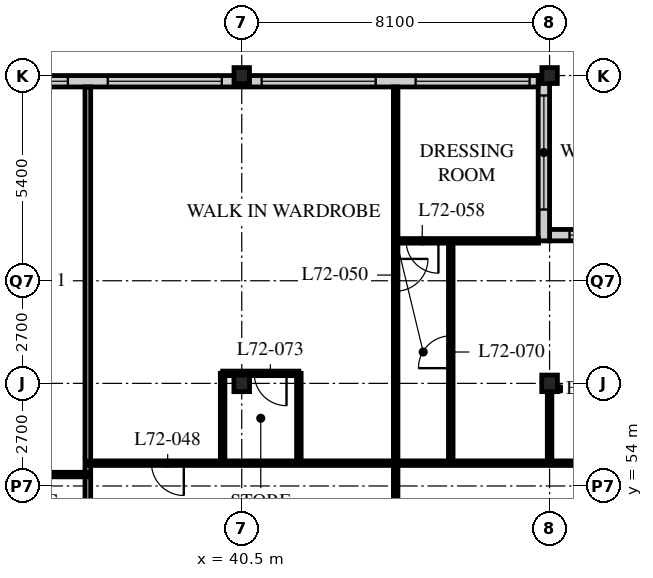
"""IFC4 building model, lengths in metres.
Left out: names, types, materials, properties, quantities, classifications, styles, units other than length and angle.
Written with IfcOpenShell. Run it as: python <this file> out.ifc"""

import sys

from ifc_helpers import new_model, si_unit, direction, frame, frame_2d, origin, origin_2d, place, context, subcontext, project, spatial, rectangle, i_section, extrude, element, fill, save


model = new_model("IFC4")
c1 = context("Model", 3, precision=1e-05, world=origin(), true_north=direction((0.0, 1.0)))
c2 = subcontext(c1, "Body", "Model", "MODEL_VIEW")
j1 = project(units=[si_unit("LENGTHUNIT", "METRE"), si_unit("PLANEANGLEUNIT", "RADIAN")], contexts=[c1])
p1 = place(None, origin())
s1 = spatial("IfcSite", under=j1, at=p1, CompositionType="ELEMENT")
p2 = place(p1, origin())
s2 = spatial("IfcBuilding", under=s1, at=p2, CompositionType="ELEMENT")
p3 = place(p2, frame((0.0, 0.0, 281.4)))
s3 = spatial("IfcBuildingStorey", under=s2, at=p3, CompositionType="ELEMENT", Elevation=281.4)
p4 = place(p3, frame((40.5, 56.7, 0.0), z_axis=(0.0, 0.0, 1.0), x_axis=(1.0, 0.0, 0.0)))
e1 = element("IfcColumn", 1, at=p4, inside=s3, PredefinedType="COLUMN", context=c2, shape_type="SweptSolid", body=[
    extrude(i_section(OverallWidth=0.412, OverallDepth=0.437, WebThickness=0.036, FlangeThickness=0.058, FilletRadius=0.015, at=origin_2d()), origin(), (0.0, 0.0, 1.0), 3.9),
])
p5 = place(p3, frame((40.5, 64.8, 0.0), z_axis=(0.0, 0.0, 1.0), x_axis=(1.0, 0.0, 0.0)))
e2 = element("IfcColumn", 2, at=p5, inside=s3, PredefinedType="COLUMN", context=c2, shape_type="SweptSolid", body=[
    extrude(i_section(OverallWidth=0.407, OverallDepth=0.419, WebThickness=0.031, FlangeThickness=0.049, FilletRadius=0.015, at=origin_2d()), origin(), (0.0, 0.0, 1.0), 3.9),
])
p6 = place(p3, frame((48.6, 56.7, 0.0), z_axis=(0.0, 0.0, 1.0), x_axis=(1.0, 0.0, 0.0)))
e3 = element("IfcColumn", 3, at=p6, inside=s3, PredefinedType="COLUMN", context=c2, shape_type="SweptSolid", body=[
    extrude(i_section(OverallWidth=0.412, OverallDepth=0.437, WebThickness=0.036, FlangeThickness=0.058, FilletRadius=0.015, at=origin_2d()), origin(), (0.0, 0.0, 1.0), 3.9),
])
p7 = place(p3, frame((48.6, 64.8, 0.0), z_axis=(0.0, 0.0, 1.0), x_axis=(1.0, 0.0, 0.0)))
e4 = element("IfcColumn", 4, at=p7, inside=s3, PredefinedType="COLUMN", context=c2, shape_type="SweptSolid", body=[
    extrude(i_section(OverallWidth=0.407, OverallDepth=0.419, WebThickness=0.031, FlangeThickness=0.049, FilletRadius=0.015, at=origin_2d()), origin(), (0.0, 0.0, 1.0), 3.9),
])
p8 = place(p3, frame((52.35, 60.6, 0.0), z_axis=(0.0, 0.0, 1.0), x_axis=(-1.0, 0.0, 0.0)))
e5 = element("IfcWall", 5, at=p8, inside=s3, PredefinedType="SOLIDWALL", context=c2, shape_type="SweptSolid", body=[
    extrude(rectangle(XDim=3.75, YDim=0.3, at=frame_2d((1.875, 0.0))), origin(), (0.0, 0.0, 1.0), 3.69),
])
p9 = place(p8, frame((0.225, 0.0, 0.6)))
e6 = element("IfcOpeningElement", 6, at=p9, cuts=e5, PredefinedType="OPENING", context=c2, shape_type="SweptSolid", body=[
    extrude(rectangle(XDim=3.0, YDim=2.3, at=frame_2d((1.5, 1.15))), frame((0.0, 0.16, 0.0), z_axis=(0.0, -1.0, 0.0), x_axis=(1.0, 0.0, 0.0)), (0.0, 0.0, 1.0), 0.32),
])
p10 = place(p3, frame((48.45, 60.45, 0.0), z_axis=(0.0, 0.0, 1.0), x_axis=(0.0, 1.0, 0.0)))
e7 = element("IfcWall", 7, at=p10, inside=s3, PredefinedType="SOLIDWALL", context=c2, shape_type="SweptSolid", body=[
    extrude(rectangle(XDim=4.35, YDim=0.3, at=frame_2d((2.175, 0.0))), origin(), (0.0, 0.0, 1.0), 3.69),
])
p11 = place(p10, frame((0.825, 0.0, 0.6)))
e8 = element("IfcOpeningElement", 8, at=p11, cuts=e7, PredefinedType="OPENING", context=c2, shape_type="SweptSolid", body=[
    extrude(rectangle(XDim=3.0, YDim=2.3, at=frame_2d((1.5, 1.15))), frame((0.0, 0.16, 0.0), z_axis=(0.0, -1.0, 0.0), x_axis=(1.0, 0.0, 0.0)), (0.0, 0.0, 1.0), 0.32),
])
p12 = place(p3, frame((48.3, 64.65, 0.0), z_axis=(0.0, 0.0, 1.0), x_axis=(-1.0, 0.0, 0.0)))
e9 = element("IfcWall", 9, at=p12, inside=s3, PredefinedType="SOLIDWALL", context=c2, shape_type="SweptSolid", body=[
    extrude(rectangle(XDim=40.2, YDim=0.3, at=frame_2d((20.1, 0.0))), origin(), (0.0, 0.0, 1.0), 3.69),
])
p13 = place(p12, frame((0.225, 0.0, 0.6)))
e10 = element("IfcOpeningElement", 10, at=p13, cuts=e9, PredefinedType="OPENING", context=c2, shape_type="SweptSolid", body=[
    extrude(rectangle(XDim=3.0, YDim=2.4, at=frame_2d((1.5, 1.2))), frame((0.0, 0.16, 0.0), z_axis=(0.0, -1.0, 0.0), x_axis=(1.0, 0.0, 0.0)), (0.0, 0.0, 1.0), 0.32),
])
p14 = place(p12, frame((4.275, 0.0, 0.6)))
e11 = element("IfcOpeningElement", 11, at=p14, cuts=e9, PredefinedType="OPENING", context=c2, shape_type="SweptSolid", body=[
    extrude(rectangle(XDim=3.0, YDim=2.4, at=frame_2d((1.5, 1.2))), frame((0.0, 0.16, 0.0), z_axis=(0.0, -1.0, 0.0), x_axis=(1.0, 0.0, 0.0)), (0.0, 0.0, 1.0), 0.32),
])
p15 = place(p12, frame((8.325, 0.0, 0.6)))
e12 = element("IfcOpeningElement", 12, at=p15, cuts=e9, PredefinedType="OPENING", context=c2, shape_type="SweptSolid", body=[
    extrude(rectangle(XDim=3.0, YDim=2.4, at=frame_2d((1.5, 1.2))), frame((0.0, 0.16, 0.0), z_axis=(0.0, -1.0, 0.0), x_axis=(1.0, 0.0, 0.0)), (0.0, 0.0, 1.0), 0.32),
])
p16 = place(p12, frame((12.375, 0.0, 0.6)))
e13 = element("IfcOpeningElement", 13, at=p16, cuts=e9, PredefinedType="OPENING", context=c2, shape_type="SweptSolid", body=[
    extrude(rectangle(XDim=3.0, YDim=2.4, at=frame_2d((1.5, 1.2))), frame((0.0, 0.16, 0.0), z_axis=(0.0, -1.0, 0.0), x_axis=(1.0, 0.0, 0.0)), (0.0, 0.0, 1.0), 0.32),
])
p17 = place(p12, frame((16.425, 0.0, 0.6)))
e14 = element("IfcOpeningElement", 14, at=p17, cuts=e9, PredefinedType="OPENING", context=c2, shape_type="SweptSolid", body=[
    extrude(rectangle(XDim=3.0, YDim=2.4, at=frame_2d((1.5, 1.2))), frame((0.0, 0.16, 0.0), z_axis=(0.0, -1.0, 0.0), x_axis=(1.0, 0.0, 0.0)), (0.0, 0.0, 1.0), 0.32),
])
p18 = place(p12, frame((20.475, 0.0, 0.6)))
e15 = element("IfcOpeningElement", 15, at=p18, cuts=e9, PredefinedType="OPENING", context=c2, shape_type="SweptSolid", body=[
    extrude(rectangle(XDim=3.0, YDim=2.4, at=frame_2d((1.5, 1.2))), frame((0.0, 0.16, 0.0), z_axis=(0.0, -1.0, 0.0), x_axis=(1.0, 0.0, 0.0)), (0.0, 0.0, 1.0), 0.32),
])
p19 = place(p12, frame((24.525, 0.0, 0.6)))
e16 = element("IfcOpeningElement", 16, at=p19, cuts=e9, PredefinedType="OPENING", context=c2, shape_type="SweptSolid", body=[
    extrude(rectangle(XDim=3.0, YDim=2.4, at=frame_2d((1.5, 1.2))), frame((0.0, 0.16, 0.0), z_axis=(0.0, -1.0, 0.0), x_axis=(1.0, 0.0, 0.0)), (0.0, 0.0, 1.0), 0.32),
])
p20 = place(p12, frame((28.575, 0.0, 0.6)))
e17 = element("IfcOpeningElement", 17, at=p20, cuts=e9, PredefinedType="OPENING", context=c2, shape_type="SweptSolid", body=[
    extrude(rectangle(XDim=3.0, YDim=2.4, at=frame_2d((1.5, 1.2))), frame((0.0, 0.16, 0.0), z_axis=(0.0, -1.0, 0.0), x_axis=(1.0, 0.0, 0.0)), (0.0, 0.0, 1.0), 0.32),
])
p21 = place(p12, frame((32.625, 0.0, 0.6)))
e18 = element("IfcOpeningElement", 18, at=p21, cuts=e9, PredefinedType="OPENING", context=c2, shape_type="SweptSolid", body=[
    extrude(rectangle(XDim=3.0, YDim=2.4, at=frame_2d((1.5, 1.2))), frame((0.0, 0.16, 0.0), z_axis=(0.0, -1.0, 0.0), x_axis=(1.0, 0.0, 0.0)), (0.0, 0.0, 1.0), 0.32),
])
p22 = place(p12, frame((36.675, 0.0, 0.6)))
e19 = element("IfcOpeningElement", 19, at=p22, cuts=e9, PredefinedType="OPENING", context=c2, shape_type="SweptSolid", body=[
    extrude(rectangle(XDim=3.0, YDim=2.4, at=frame_2d((1.5, 1.2))), frame((0.0, 0.16, 0.0), z_axis=(0.0, -1.0, 0.0), x_axis=(1.0, 0.0, 0.0)), (0.0, 0.0, 1.0), 0.32),
])
p23 = place(p3, frame((36.45, 64.5, 0.0), z_axis=(0.0, 0.0, 1.0), x_axis=(0.0, -1.0, 0.0)))
e20 = element("IfcWall", 20, at=p23, inside=s3, PredefinedType="PARTITIONING", context=c2, shape_type="SweptSolid", body=[
    extrude(rectangle(XDim=15.9, YDim=0.15, at=frame_2d((7.95, 0.0))), origin(), (0.0, 0.0, 1.0), 3.69),
])
p24 = place(p3, frame((36.45, 54.6, 0.0), z_axis=(0.0, 0.0, 1.0), x_axis=(1.0, 0.0, 0.0)))
e21 = element("IfcWall", 21, at=p24, inside=s3, PredefinedType="PARTITIONING", context=c2, shape_type="SweptSolid", body=[
    extrude(rectangle(XDim=19.95, YDim=0.12, at=frame_2d((9.975, 0.0))), origin(), (0.0, 0.0, 1.0), 3.69),
])
p25 = place(p24, frame((1.675, 0.0, 0.0)))
e22 = element("IfcOpeningElement", 22, at=p25, cuts=e21, PredefinedType="OPENING", context=c2, shape_type="SweptSolid", body=[
    extrude(rectangle(XDim=0.85, YDim=2.1, at=frame_2d((0.425, 1.05))), frame((0.0, 0.07, 0.0), z_axis=(0.0, -1.0, 0.0), x_axis=(1.0, 0.0, 0.0)), (0.0, 0.0, 1.0), 0.14),
])
p26 = place(p3, frame((44.55, 64.5, 0.0), z_axis=(0.0, 0.0, 1.0), x_axis=(0.0, -1.0, 0.0)))
e23 = element("IfcWall", 23, at=p26, inside=s3, PredefinedType="PARTITIONING", context=c2, shape_type="SweptSolid", body=[
    extrude(rectangle(XDim=17.7, YDim=0.12, at=frame_2d((8.85, 0.0))), origin(), (0.0, 0.0, 1.0), 3.69),
])
p27 = place(p26, frame((12.475, 0.0, 0.0)))
e24 = element("IfcOpeningElement", 24, at=p27, cuts=e23, PredefinedType="OPENING", context=c2, shape_type="SweptSolid", body=[
    extrude(rectangle(XDim=0.85, YDim=2.1, at=frame_2d((0.425, 1.05))), frame((0.0, 0.07, 0.0), z_axis=(0.0, -1.0, 0.0), x_axis=(1.0, 0.0, 0.0)), (0.0, 0.0, 1.0), 0.14),
])
p28 = place(p26, frame((4.525, 0.0, 0.0)))
e25 = element("IfcOpeningElement", 25, at=p28, cuts=e23, PredefinedType="OPENING", context=c2, shape_type="SweptSolid", body=[
    extrude(rectangle(XDim=0.85, YDim=2.1, at=frame_2d((0.425, 1.05))), frame((0.0, 0.07, 0.0), z_axis=(0.0, -1.0, 0.0), x_axis=(1.0, 0.0, 0.0)), (0.0, 0.0, 1.0), 0.14),
])
p29 = place(p3, frame((48.31, 60.45, 0.0), z_axis=(0.0, 0.0, 1.0), x_axis=(-1.0, 0.0, 0.0)))
e26 = element("IfcWall", 26, at=p29, inside=s3, PredefinedType="PARTITIONING", context=c2, shape_type="SweptSolid", body=[
    extrude(rectangle(XDim=3.76, YDim=0.12, at=frame_2d((1.88, 0.0))), origin(), (0.0, 0.0, 1.0), 3.69),
])
p30 = place(p29, frame((2.635, 0.0, 0.0)))
e27 = element("IfcOpeningElement", 27, at=p30, cuts=e26, PredefinedType="OPENING", context=c2, shape_type="SweptSolid", body=[
    extrude(rectangle(XDim=0.85, YDim=2.1, at=frame_2d((0.425, 1.05))), frame((0.0, 0.07, 0.0), z_axis=(0.0, -1.0, 0.0), x_axis=(1.0, 0.0, 0.0)), (0.0, 0.0, 1.0), 0.14),
])
p31 = place(p3, frame((32.4, 54.3, 0.0), z_axis=(0.0, 0.0, 1.0), x_axis=(1.0, 0.0, 0.0)))
e28 = element("IfcWall", 28, at=p31, inside=s3, PredefinedType="PARTITIONING", context=c2, shape_type="SweptSolid", body=[
    extrude(rectangle(XDim=4.05, YDim=0.12, at=frame_2d((2.025, 0.0))), origin(), (0.0, 0.0, 1.0), 3.69),
])
p32 = place(p31, frame((1.6, 0.0, 0.0)))
e29 = element("IfcOpeningElement", 29, at=p32, cuts=e28, PredefinedType="OPENING", context=c2, shape_type="SweptSolid", body=[
    extrude(rectangle(XDim=0.85, YDim=2.1, at=frame_2d((0.425, 1.05))), frame((0.0, 0.07, 0.0), z_axis=(0.0, -1.0, 0.0), x_axis=(1.0, 0.0, 0.0)), (0.0, 0.0, 1.0), 0.14),
])
p33 = place(p3, frame((46.0, 54.6, 0.0), z_axis=(0.0, 0.0, 1.0), x_axis=(0.0, 1.0, 0.0)))
e30 = element("IfcWall", 30, at=p33, inside=s3, PredefinedType="PARTITIONING", context=c2, shape_type="SweptSolid", body=[
    extrude(rectangle(XDim=5.85, YDim=0.12, at=frame_2d((2.925, 0.0))), origin(), (0.0, 0.0, 1.0), 3.69),
])
p34 = place(p33, frame((2.5, 0.0, 0.0)))
e31 = element("IfcOpeningElement", 31, at=p34, cuts=e30, PredefinedType="OPENING", context=c2, shape_type="SweptSolid", body=[
    extrude(rectangle(XDim=0.85, YDim=2.1, at=frame_2d((0.425, 1.05))), frame((0.0, 0.07, 0.0), z_axis=(0.0, -1.0, 0.0), x_axis=(1.0, 0.0, 0.0)), (0.0, 0.0, 1.0), 0.14),
])
for number, where, z_axis, x_axis in (
    (32, (39.997, 54.6, 0.0), (0.0, 0.0, 1.0), (0.0, 1.0, 0.0)),
    (33, (42.003, 54.6, 0.0), (0.0, 0.0, 1.0), (0.0, 1.0, 0.0)),
):
    element("IfcWall", number, at=place(p3, frame(where, z_axis=z_axis, x_axis=x_axis)), inside=s3, PredefinedType="PARTITIONING", context=c2, shape_type="SweptSolid", body=[
        extrude(rectangle(XDim=2.363, YDim=0.12, at=frame_2d((1.181, 0.0))), origin(), (0.0, 0.0, 1.0), 3.69),
    ])
p35 = place(p3, frame((39.997, 56.963, 0.0), z_axis=(0.0, 0.0, 1.0), x_axis=(1.0, 0.0, 0.0)))
e34 = element("IfcWall", 34, at=p35, inside=s3, PredefinedType="PARTITIONING", context=c2, shape_type="SweptSolid", body=[
    extrude(rectangle(XDim=2.006, YDim=0.12, at=frame_2d((1.003, 0.0))), origin(), (0.0, 0.0, 1.0), 3.69),
])
p36 = place(p35, frame((0.831, 0.0, 0.0)))
e35 = element("IfcOpeningElement", 35, at=p36, cuts=e34, PredefinedType="OPENING", context=c2, shape_type="SweptSolid", body=[
    extrude(rectangle(XDim=0.85, YDim=2.1, at=frame_2d((0.425, 1.05))), frame((0.0, 0.07, 0.0), z_axis=(0.0, -1.0, 0.0), x_axis=(1.0, 0.0, 0.0)), (0.0, 0.0, 1.0), 0.14),
])
p37 = place(p3, frame((48.6, 54.6, 0.0), z_axis=(0.0, 0.0, 1.0), x_axis=(0.0, 1.0, 0.0)))
e36 = element("IfcWall", 36, at=p37, inside=s3, PredefinedType="PARTITIONING", context=c2, shape_type="SweptSolid", body=[
    extrude(rectangle(XDim=1.897, YDim=0.12, at=frame_2d((0.948, 0.0))), origin(), (0.0, 0.0, 1.0), 3.078),
])
p38 = place(p9, origin())
e37 = element("IfcWindow", 37, at=p38, inside=s3, PartitioningType="SINGLE_PANEL", PredefinedType="WINDOW", context=c2, shape_type="SweptSolid", body=[
    extrude(rectangle(XDim=3.0, YDim=2.3, at=frame_2d((1.5, 1.15))), frame((0.0, 0.03, 0.0), z_axis=(0.0, -1.0, 0.0), x_axis=(1.0, 0.0, 0.0)), (0.0, 0.0, 1.0), 0.06),
])
fill(e6, e37)
p39 = place(p11, origin())
e38 = element("IfcWindow", 38, at=p39, inside=s3, PartitioningType="SINGLE_PANEL", PredefinedType="WINDOW", context=c2, shape_type="SweptSolid", body=[
    extrude(rectangle(XDim=3.0, YDim=2.3, at=frame_2d((1.5, 1.15))), frame((0.0, 0.03, 0.0), z_axis=(0.0, -1.0, 0.0), x_axis=(1.0, 0.0, 0.0)), (0.0, 0.0, 1.0), 0.06),
])
fill(e8, e38)
p40 = place(p13, origin())
e39 = element("IfcWindow", 39, at=p40, inside=s3, PartitioningType="SINGLE_PANEL", PredefinedType="WINDOW", context=c2, shape_type="SweptSolid", body=[
    extrude(rectangle(XDim=3.0, YDim=2.4, at=frame_2d((1.5, 1.2))), frame((0.0, 0.03, 0.0), z_axis=(0.0, -1.0, 0.0), x_axis=(1.0, 0.0, 0.0)), (0.0, 0.0, 1.0), 0.06),
])
fill(e10, e39)
p41 = place(p14, origin())
e40 = element("IfcWindow", 40, at=p41, inside=s3, PartitioningType="SINGLE_PANEL", PredefinedType="WINDOW", context=c2, shape_type="SweptSolid", body=[
    extrude(rectangle(XDim=3.0, YDim=2.4, at=frame_2d((1.5, 1.2))), frame((0.0, 0.03, 0.0), z_axis=(0.0, -1.0, 0.0), x_axis=(1.0, 0.0, 0.0)), (0.0, 0.0, 1.0), 0.06),
])
fill(e11, e40)
p42 = place(p15, origin())
e41 = element("IfcWindow", 41, at=p42, inside=s3, PartitioningType="SINGLE_PANEL", PredefinedType="WINDOW", context=c2, shape_type="SweptSolid", body=[
    extrude(rectangle(XDim=3.0, YDim=2.4, at=frame_2d((1.5, 1.2))), frame((0.0, 0.03, 0.0), z_axis=(0.0, -1.0, 0.0), x_axis=(1.0, 0.0, 0.0)), (0.0, 0.0, 1.0), 0.06),
])
fill(e12, e41)
p43 = place(p16, origin())
e42 = element("IfcWindow", 42, at=p43, inside=s3, PartitioningType="SINGLE_PANEL", PredefinedType="WINDOW", context=c2, shape_type="SweptSolid", body=[
    extrude(rectangle(XDim=3.0, YDim=2.4, at=frame_2d((1.5, 1.2))), frame((0.0, 0.03, 0.0), z_axis=(0.0, -1.0, 0.0), x_axis=(1.0, 0.0, 0.0)), (0.0, 0.0, 1.0), 0.06),
])
fill(e13, e42)
p44 = place(p25, origin())
e43 = element("IfcDoor", 43, at=p44, inside=s3, OperationType="SINGLE_SWING_LEFT", PredefinedType="DOOR", context=c2, shape_type="SweptSolid", body=[
    extrude(rectangle(XDim=0.85, YDim=2.1, at=frame_2d((0.425, 1.05))), frame((0.0, 0.025, 0.0), z_axis=(0.0, -1.0, 0.0), x_axis=(1.0, 0.0, 0.0)), (0.0, 0.0, 1.0), 0.05),
])
fill(e22, e43)
p45 = place(p28, origin())
e44 = element("IfcDoor", 44, at=p45, inside=s3, OperationType="SINGLE_SWING_LEFT", PredefinedType="DOOR", context=c2, shape_type="SweptSolid", body=[
    extrude(rectangle(XDim=0.85, YDim=2.1, at=frame_2d((0.425, 1.05))), frame((0.0, 0.025, 0.0), z_axis=(0.0, -1.0, 0.0), x_axis=(1.0, 0.0, 0.0)), (0.0, 0.0, 1.0), 0.05),
])
fill(e25, e44)
p46 = place(p30, origin())
e45 = element("IfcDoor", 45, at=p46, inside=s3, OperationType="SINGLE_SWING_LEFT", PredefinedType="DOOR", context=c2, shape_type="SweptSolid", body=[
    extrude(rectangle(XDim=0.85, YDim=2.1, at=frame_2d((0.425, 1.05))), frame((0.0, 0.025, 0.0), z_axis=(0.0, -1.0, 0.0), x_axis=(1.0, 0.0, 0.0)), (0.0, 0.0, 1.0), 0.05),
])
fill(e27, e45)
p47 = place(p34, origin())
e46 = element("IfcDoor", 46, at=p47, inside=s3, OperationType="SINGLE_SWING_LEFT", PredefinedType="DOOR", context=c2, shape_type="SweptSolid", body=[
    extrude(rectangle(XDim=0.85, YDim=2.1, at=frame_2d((0.425, 1.05))), frame((0.0, 0.025, 0.0), z_axis=(0.0, -1.0, 0.0), x_axis=(1.0, 0.0, 0.0)), (0.0, 0.0, 1.0), 0.05),
])
fill(e31, e46)
p48 = place(p36, origin())
e47 = element("IfcDoor", 47, at=p48, inside=s3, OperationType="SINGLE_SWING_LEFT", PredefinedType="DOOR", context=c2, shape_type="SweptSolid", body=[
    extrude(rectangle(XDim=0.85, YDim=2.1, at=frame_2d((0.425, 1.05))), frame((0.0, 0.025, 0.0), z_axis=(0.0, -1.0, 0.0), x_axis=(1.0, 0.0, 0.0)), (0.0, 0.0, 1.0), 0.05),
])
fill(e35, e47)
save(model, sys.argv[1])
